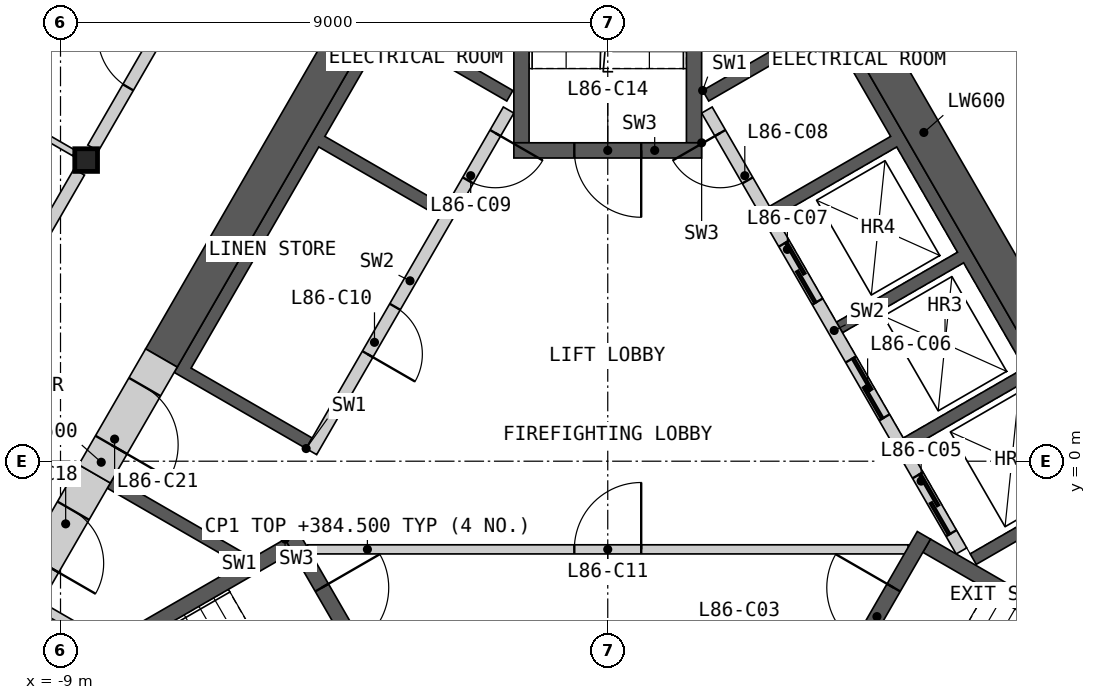
"""IFC4 building model, lengths in metres.
Left out: names, types, materials, properties, quantities, classifications, styles, units other than length and angle.
Written with IfcOpenShell. Run it as: python <this file> out.ifc"""

import sys

from ifc_helpers import new_model, si_unit, direction, frame, frame_2d, origin, origin_2d, place, context, subcontext, project, spatial, polyline, rectangle, i_section, outline, extrude, element, fill, save


model = new_model("IFC4")
c1 = context("Model", 3, precision=1e-05, world=origin(), true_north=direction((0.0, 1.0)))
c2 = subcontext(c1, "Body", "Model", "MODEL_VIEW")
j1 = project(units=[si_unit("LENGTHUNIT", "METRE"), si_unit("PLANEANGLEUNIT", "RADIAN")], contexts=[c1])
p1 = place(None, origin())
s1 = spatial("IfcSite", under=j1, at=p1, CompositionType="ELEMENT")
p2 = place(p1, origin())
s2 = spatial("IfcBuilding", under=s1, at=p2, CompositionType="ELEMENT")
p3 = place(p2, frame((0.0, 0.0, 381.4)))
s3 = spatial("IfcBuildingStorey", under=s2, at=p3, CompositionType="ELEMENT", Elevation=381.4)
p4 = place(p3, frame((-8.578, 4.953, 0.0), z_axis=(0.0, 0.0, 1.0), x_axis=(1.0, 0.0, 0.0)))
e1 = element("IfcColumn", 1, at=p4, inside=s3, PredefinedType="COLUMN", context=c2, shape_type="SweptSolid", body=[
    extrude(i_section(OverallWidth=0.374, OverallDepth=0.372, WebThickness=0.016, FlangeThickness=0.026, at=origin_2d()), origin(), (0.0, 0.0, 1.0), 3.4),
])
p5 = place(p3, origin())
e2 = element("IfcWall", 2, at=p5, inside=s3, PredefinedType="SHEAR", context=c2, shape_type="SweptSolid", body=[
    extrude(outline(polyline([(1.561, 6.097), (3.731, 7.35), (8.231, -0.444), (6.061, -1.697), (5.96, -1.524), (7.952, -0.374), (6.952, 1.358), (4.96, 0.208), (4.861, 0.381), (6.852, 1.531), (5.852, 3.263), (3.861, 2.113), (3.76, 2.287), (5.752, 3.437), (4.752, 5.169), (2.76, 4.019), (2.66, 4.192), (4.652, 5.342), (3.652, 7.074), (1.66, 5.924), (1.561, 6.097)])), origin(), (0.0, 0.0, 1.0), 3.1),
])
p6 = place(p3, frame((5.817, -1.476, 0.0), z_axis=(0.0, 0.0, 1.0), x_axis=(-0.500002616675, 0.866023893041, 0.0)))
e3 = element("IfcWall", 3, at=p6, inside=s3, PredefinedType="SOLIDWALL", context=c2, shape_type="SweptSolid", body=[
    extrude(rectangle(XDim=8.373, YDim=0.2, at=frame_2d((4.187, 0.0))), origin(), (0.0, 0.0, 1.0), 3.1),
])
p7 = place(p6, frame((0.337, 0.0, 0.0)))
e4 = element("IfcOpeningElement", 4, at=p7, cuts=e3, PredefinedType="OPENING", context=c2, shape_type="SweptSolid", body=[
    extrude(rectangle(XDim=1.1, YDim=2.1, at=frame_2d((0.55, 1.05))), frame((0.0, 0.11, 0.0), z_axis=(0.0, -1.0, 0.0), x_axis=(1.0, 0.0, 0.0)), (0.0, 0.0, 1.0), 0.22),
])
p8 = place(p6, frame((2.537, 0.0, 0.0)))
e5 = element("IfcOpeningElement", 5, at=p8, cuts=e3, PredefinedType="OPENING", context=c2, shape_type="SweptSolid", body=[
    extrude(rectangle(XDim=1.1, YDim=2.1, at=frame_2d((0.55, 1.05))), frame((0.0, 0.11, 0.0), z_axis=(0.0, -1.0, 0.0), x_axis=(1.0, 0.0, 0.0)), (0.0, 0.0, 1.0), 0.22),
])
p9 = place(p6, frame((4.737, 0.0, 0.0)))
e6 = element("IfcOpeningElement", 6, at=p9, cuts=e3, PredefinedType="OPENING", context=c2, shape_type="SweptSolid", body=[
    extrude(rectangle(XDim=1.1, YDim=2.1, at=frame_2d((0.55, 1.05))), frame((0.0, 0.11, 0.0), z_axis=(0.0, -1.0, 0.0), x_axis=(1.0, 0.0, 0.0)), (0.0, 0.0, 1.0), 0.22),
])
p10 = place(p6, frame((7.037, 0.0, 0.0)))
e7 = element("IfcOpeningElement", 7, at=p10, cuts=e3, PredefinedType="OPENING", context=c2, shape_type="SweptSolid", body=[
    extrude(rectangle(XDim=0.9, YDim=2.1, at=frame_2d((0.45, 1.05))), frame((0.0, 0.11, 0.0), z_axis=(0.0, -1.0, 0.0), x_axis=(1.0, 0.0, 0.0)), (0.0, 0.0, 1.0), 0.22),
])
p11 = place(p3, origin())
e8 = element("IfcWall", 8, at=p11, inside=s3, PredefinedType="SHEAR", context=c2, shape_type="SweptSolid", body=[
    extrude(outline(polyline([(-6.061, -1.697), (-8.231, -0.444), (-8.131, -0.271), (-5.96, -1.524), (-6.061, -1.697)])), origin(), (0.0, 0.0, 1.0), 3.1),
])
p12 = place(p3, origin())
e9 = element("IfcWall", 9, at=p12, inside=s3, PredefinedType="SHEAR", context=c2, shape_type="SweptSolid", body=[
    extrude(outline(polyline([(-4.96, 0.208), (-7.131, 1.461), (-3.731, 7.35), (-1.561, 6.097), (-1.66, 5.924), (-3.652, 7.074), (-4.652, 5.342), (-2.66, 4.192), (-2.76, 4.019), (-4.752, 5.169), (-6.852, 1.531), (-4.861, 0.381), (-4.96, 0.208)])), origin(), (0.0, 0.0, 1.0), 3.1),
])
p13 = place(p3, frame((-1.631, 5.776, 0.0), z_axis=(0.0, 0.0, 1.0), x_axis=(-0.499992876559, -0.866029516466, 0.0)))
e10 = element("IfcWall", 10, at=p13, inside=s3, PredefinedType="SOLIDWALL", context=c2, shape_type="SweptSolid", body=[
    extrude(rectangle(XDim=6.486, YDim=0.2, at=frame_2d((3.243, 0.0))), origin(), (0.0, 0.0, 1.0), 3.1),
])
p14 = place(p13, frame((0.437, 0.0, 0.0)))
e11 = element("IfcOpeningElement", 11, at=p14, cuts=e10, PredefinedType="OPENING", context=c2, shape_type="SweptSolid", body=[
    extrude(rectangle(XDim=0.9, YDim=2.1, at=frame_2d((0.45, 1.05))), frame((0.0, 0.11, 0.0), z_axis=(0.0, -1.0, 0.0), x_axis=(1.0, 0.0, 0.0)), (0.0, 0.0, 1.0), 0.22),
])
p15 = place(p13, frame((3.737, 0.0, 0.0)))
e12 = element("IfcOpeningElement", 12, at=p15, cuts=e10, PredefinedType="OPENING", context=c2, shape_type="SweptSolid", body=[
    extrude(rectangle(XDim=0.9, YDim=2.1, at=frame_2d((0.45, 1.05))), frame((0.0, 0.11, 0.0), z_axis=(0.0, -1.0, 0.0), x_axis=(1.0, 0.0, 0.0)), (0.0, 0.0, 1.0), 0.22),
])
p16 = place(p3, frame((-4.941, -1.45, 0.0), z_axis=(0.0, 0.0, 1.0), x_axis=(1.0, 0.0, 0.0)))
e13 = element("IfcWall", 13, at=p16, inside=s3, PredefinedType="PARTITIONING", context=c2, shape_type="SweptSolid", body=[
    extrude(rectangle(XDim=9.882, YDim=0.15, at=frame_2d((4.941, 0.0))), origin(), (0.0, 0.0, 1.0), 3.1),
])
p17 = place(p16, frame((4.391, 0.0, 0.0)))
e14 = element("IfcOpeningElement", 14, at=p17, cuts=e13, PredefinedType="OPENING", context=c2, shape_type="SweptSolid", body=[
    extrude(rectangle(XDim=1.1, YDim=2.1, at=frame_2d((0.55, 1.05))), frame((0.0, 0.085, 0.0), z_axis=(0.0, -1.0, 0.0), x_axis=(1.0, 0.0, 0.0)), (0.0, 0.0, 1.0), 0.17),
])
p18 = place(p3, origin())
e15 = element("IfcWall", 15, at=p18, inside=s3, PredefinedType="SHEAR", context=c2, shape_type="SweptSolid", body=[
    extrude(outline(polyline([(-5.307, -1.281), (-10.374, -4.206), (-10.032, -4.298), (-5.182, -1.498), (-5.307, -1.281)])), origin(), (0.0, 0.0, 1.0), 3.1),
])
p19 = place(p3, frame((-5.199, -1.219, 0.0), z_axis=(0.0, 0.0, 1.0), x_axis=(0.499982516597, -0.866035497597, 0.0)))
e16 = element("IfcWall", 16, at=p19, inside=s3, PredefinedType="SHEAR", context=c2, shape_type="SweptSolid", body=[
    extrude(rectangle(XDim=3.088, YDim=0.25, at=frame_2d((1.544, 0.0))), origin(), (0.0, 0.0, 1.0), 3.1),
])
p20 = place(p19, frame((0.994, 0.0, 0.0)))
e17 = element("IfcOpeningElement", 17, at=p20, cuts=e16, PredefinedType="OPENING", context=c2, shape_type="SweptSolid", body=[
    extrude(rectangle(XDim=1.1, YDim=2.1, at=frame_2d((0.55, 1.05))), frame((0.0, 0.135, 0.0), z_axis=(0.0, -1.0, 0.0), x_axis=(1.0, 0.0, 0.0)), (0.0, 0.0, 1.0), 0.27),
])
p21 = place(p3, origin())
e18 = element("IfcWall", 18, at=p21, inside=s3, PredefinedType="SHEAR", context=c2, shape_type="SweptSolid", body=[
    extrude(outline(polyline([(10.032, -4.298), (10.374, -4.206), (5.307, -1.281), (5.182, -1.498), (10.032, -4.298)])), origin(), (0.0, 0.0, 1.0), 3.1),
])
p22 = place(p3, frame((3.655, -3.893, 0.0), z_axis=(0.0, 0.0, 1.0), x_axis=(0.499982516597, 0.866035497597, 0.0)))
e19 = element("IfcWall", 19, at=p22, inside=s3, PredefinedType="SHEAR", context=c2, shape_type="SweptSolid", body=[
    extrude(rectangle(XDim=3.088, YDim=0.25, at=frame_2d((1.544, 0.0))), origin(), (0.0, 0.0, 1.0), 3.1),
])
p23 = place(p22, frame((0.994, 0.0, 0.0)))
e20 = element("IfcOpeningElement", 20, at=p23, cuts=e19, PredefinedType="OPENING", context=c2, shape_type="SweptSolid", body=[
    extrude(rectangle(XDim=1.1, YDim=2.1, at=frame_2d((0.55, 1.05))), frame((0.0, 0.135, 0.0), z_axis=(0.0, -1.0, 0.0), x_axis=(1.0, 0.0, 0.0)), (0.0, 0.0, 1.0), 0.27),
])
p24 = place(p3, origin())
e21 = element("IfcWall", 21, at=p24, inside=s3, PredefinedType="SHEAR", context=c2, shape_type="SweptSolid", body=[
    extrude(outline(polyline([(1.544, 5.237), (1.544, 11.087), (1.294, 10.837), (1.294, 5.237), (1.544, 5.237)])), origin(), (0.0, 0.0, 1.0), 3.1),
])
p25 = place(p3, origin())
e22 = element("IfcWall", 22, at=p25, inside=s3, PredefinedType="SHEAR", context=c2, shape_type="SweptSolid", body=[
    extrude(outline(polyline([(-1.294, 10.837), (-1.544, 11.087), (-1.544, 5.237), (-1.294, 5.237), (-1.294, 10.837)])), origin(), (0.0, 0.0, 1.0), 3.1),
])
p26 = place(p3, frame((1.544, 5.112, 0.0), z_axis=(0.0, 0.0, 1.0), x_axis=(-1.0, 0.0, 0.0)))
e23 = element("IfcWall", 23, at=p26, inside=s3, PredefinedType="SHEAR", context=c2, shape_type="SweptSolid", body=[
    extrude(rectangle(XDim=3.088, YDim=0.25, at=frame_2d((1.544, 0.0))), origin(), (0.0, 0.0, 1.0), 3.1),
])
p27 = place(p26, frame((0.994, 0.0, 0.0)))
e24 = element("IfcOpeningElement", 24, at=p27, cuts=e23, PredefinedType="OPENING", context=c2, shape_type="SweptSolid", body=[
    extrude(rectangle(XDim=1.1, YDim=2.1, at=frame_2d((0.55, 1.05))), frame((0.0, 0.135, 0.0), z_axis=(0.0, -1.0, 0.0), x_axis=(1.0, 0.0, 0.0)), (0.0, 0.0, 1.0), 0.27),
])
p28 = place(p3, frame((-9.35, -2.383, 0.0), z_axis=(0.0, 0.0, 1.0), x_axis=(0.866057962423, -0.499943602543, 0.0)))
e25 = element("IfcWall", 25, at=p28, inside=s3, PredefinedType="PARTITIONING", context=c2, shape_type="SweptSolid", body=[
    extrude(rectangle(XDim=1.242, YDim=0.15, at=frame_2d((0.621, 0.0))), origin(), (0.0, 0.0, 1.0), 3.1),
])
p29 = place(p3, frame((8.841, -0.902, 0.0), z_axis=(0.0, 0.0, 1.0), x_axis=(-0.499995618375, 0.866027933502, 0.0)))
e26 = element("IfcWall", 26, at=p29, inside=s3, PredefinedType="SHEAR", context=c2, shape_type="SweptSolid", body=[
    extrude(rectangle(XDim=14.571, YDim=0.6, at=frame_2d((7.285, 0.0))), origin(), (0.0, 0.0, 1.0), 3.1),
])
p30 = place(p3, frame((-3.639, 8.107, 0.0), z_axis=(0.0, 0.0, 1.0), x_axis=(-0.49999180351, -0.866030135978, 0.0)))
e27 = element("IfcWall", 27, at=p30, inside=s3, PredefinedType="SHEAR", context=c2, shape_type="SweptSolid", body=[
    extrude(rectangle(XDim=7.401, YDim=0.6, at=frame_2d((3.701, 0.0))), origin(), (0.0, 0.0, 1.0), 3.1),
])
p31 = place(p3, frame((-8.44, -0.208, 0.0), z_axis=(0.0, 0.0, 1.0), x_axis=(-0.500001951578, -0.866024277037, 0.0)))
e28 = element("IfcWall", 28, at=p31, inside=s3, PredefinedType="SHEAR", context=c2, shape_type="SweptSolid", body=[
    extrude(rectangle(XDim=2.243, YDim=0.6, at=frame_2d((1.122, 0.0))), origin(), (0.0, 0.0, 1.0), 3.1),
])
p32 = place(p31, frame((0.7, 0.0, 0.0)))
e29 = element("IfcOpeningElement", 29, at=p32, cuts=e28, PredefinedType="OPENING", context=c2, shape_type="SweptSolid", body=[
    extrude(rectangle(XDim=1.0, YDim=2.1, at=frame_2d((0.5, 1.05))), frame((0.0, 0.31, 0.0), z_axis=(0.0, -1.0, 0.0), x_axis=(1.0, 0.0, 0.0)), (0.0, 0.0, 1.0), 0.62),
])
p33 = place(p3, frame((-7.34, 1.698, 0.0), z_axis=(0.0, 0.0, 1.0), x_axis=(-0.50002983664, -0.866008176907, 0.0)))
e30 = element("IfcWall", 30, at=p33, inside=s3, PredefinedType="SHEAR", context=c2, shape_type="SweptSolid", body=[
    extrude(rectangle(XDim=2.2, YDim=0.6, at=frame_2d((1.1, 0.0))), origin(), (0.0, 0.0, 1.0), 3.1),
])
p34 = place(p33, frame((0.55, 0.0, 0.0)))
e31 = element("IfcOpeningElement", 31, at=p34, cuts=e30, PredefinedType="OPENING", context=c2, shape_type="SweptSolid", body=[
    extrude(rectangle(XDim=1.1, YDim=2.1, at=frame_2d((0.55, 1.05))), frame((0.0, 0.31, 0.0), z_axis=(0.0, -1.0, 0.0), x_axis=(1.0, 0.0, 0.0)), (0.0, 0.0, 1.0), 0.62),
])
p35 = place(p3, frame((4.403, 12.185, 0.0), z_axis=(0.0, 0.0, 1.0), x_axis=(0.499992155518, -0.866029932751, 0.0)))
e32 = element("IfcWall", 32, at=p35, inside=s3, PredefinedType="PARTITIONING", context=c2, shape_type="SweptSolid", body=[
    extrude(rectangle(XDim=8.123, YDim=0.2, at=frame_2d((4.062, 0.0))), origin(), (0.0, 0.0, 1.0), 3.1),
])
p36 = place(p35, frame((3.587, 0.0, 0.0)))
e33 = element("IfcOpeningElement", 33, at=p36, cuts=e32, PredefinedType="OPENING", context=c2, shape_type="SweptSolid", body=[
    extrude(rectangle(XDim=0.95, YDim=2.1, at=frame_2d((0.475, 1.05))), frame((0.0, 0.11, 0.0), z_axis=(0.0, -1.0, 0.0), x_axis=(1.0, 0.0, 0.0)), (0.0, 0.0, 1.0), 0.22),
])
p37 = place(p3, frame((-8.465, 5.15, 0.0), z_axis=(0.0, 0.0, 1.0), x_axis=(0.499992155518, 0.866029932751, 0.0)))
e34 = element("IfcWall", 34, at=p37, inside=s3, PredefinedType="PARTITIONING", context=c2, shape_type="SweptSolid", body=[
    extrude(rectangle(XDim=8.123, YDim=0.2, at=frame_2d((4.062, 0.0))), origin(), (0.0, 0.0, 1.0), 3.1),
])
p38 = place(p37, frame((1.153, 0.0, 0.0)))
e35 = element("IfcOpeningElement", 35, at=p38, cuts=e34, PredefinedType="OPENING", context=c2, shape_type="SweptSolid", body=[
    extrude(rectangle(XDim=1.0, YDim=2.1, at=frame_2d((0.5, 1.05))), frame((0.0, 0.11, 0.0), z_axis=(0.0, -1.0, 0.0), x_axis=(1.0, 0.0, 0.0)), (0.0, 0.0, 1.0), 0.22),
])
p39 = place(p3, frame((-12.754, -2.279, 0.0), z_axis=(0.0, 0.0, 1.0), x_axis=(0.500001682468, 0.866024432409, 0.0)))
e36 = element("IfcWall", 36, at=p39, inside=s3, PredefinedType="PARTITIONING", context=c2, shape_type="SweptSolid", body=[
    extrude(rectangle(XDim=8.124, YDim=0.2, at=frame_2d((4.062, 0.0))), origin(), (0.0, 0.0, 1.0), 3.1),
])
p40 = place(p39, frame((1.153, 0.0, 0.0)))
e37 = element("IfcOpeningElement", 37, at=p40, cuts=e36, PredefinedType="OPENING", context=c2, shape_type="SweptSolid", body=[
    extrude(rectangle(XDim=1.0, YDim=2.1, at=frame_2d((0.5, 1.05))), frame((0.0, 0.11, 0.0), z_axis=(0.0, -1.0, 0.0), x_axis=(1.0, 0.0, 0.0)), (0.0, 0.0, 1.0), 0.22),
])
p41 = place(p3, frame((3.926, 19.811, 0.0), z_axis=(0.0, 0.0, 1.0), x_axis=(0.500001082559, -0.866024778768, 0.0)))
e38 = element("IfcWall", 38, at=p41, inside=s3, PredefinedType="PARTITIONING", context=c2, shape_type="SweptSolid", body=[
    extrude(rectangle(XDim=15.094, YDim=0.2, at=frame_2d((7.547, 0.0))), origin(), (0.0, 0.0, 1.0), 2.33),
])
p42 = place(p41, frame((3.761, 0.0, 0.0)))
e39 = element("IfcOpeningElement", 39, at=p42, cuts=e38, PredefinedType="OPENING", context=c2, shape_type="SweptSolid", body=[
    extrude(rectangle(XDim=0.95, YDim=2.1, at=frame_2d((0.475, 1.05))), frame((0.0, 0.11, 0.0), z_axis=(0.0, -1.0, 0.0), x_axis=(1.0, 0.0, 0.0)), (0.0, 0.0, 1.0), 0.22),
])
p43 = place(p3, frame((-18.869, 10.894, 0.0), z_axis=(0.0, 0.0, 1.0), x_axis=(0.866023724155, -0.500002909193, 0.0)))
e40 = element("IfcWall", 40, at=p43, inside=s3, PredefinedType="PARTITIONING", context=c2, shape_type="SweptSolid", body=[
    extrude(rectangle(XDim=11.655, YDim=0.1, at=frame_2d((5.827, 0.0))), origin(), (0.0, 0.0, 1.0), 2.33),
])
p44 = place(p43, frame((6.253, 0.0, 0.0)))
e41 = element("IfcOpeningElement", 41, at=p44, cuts=e40, PredefinedType="OPENING", context=c2, shape_type="SweptSolid", body=[
    extrude(rectangle(XDim=0.95, YDim=2.1, at=frame_2d((0.475, 1.05))), frame((0.0, 0.06, 0.0), z_axis=(0.0, -1.0, 0.0), x_axis=(1.0, 0.0, 0.0)), (0.0, 0.0, 1.0), 0.12),
])
p45 = place(p7, origin())
e42 = element("IfcDoor", 42, at=p45, inside=s3, OperationType="SLIDING_TO_LEFT", PredefinedType="DOOR", context=c2, shape_type="SweptSolid", body=[
    extrude(rectangle(XDim=1.1, YDim=2.1, at=frame_2d((0.55, 1.05))), frame((0.0, 0.025, 0.0), z_axis=(0.0, -1.0, 0.0), x_axis=(1.0, 0.0, 0.0)), (0.0, 0.0, 1.0), 0.05),
])
fill(e4, e42)
p46 = place(p8, origin())
e43 = element("IfcDoor", 43, at=p46, inside=s3, OperationType="SLIDING_TO_LEFT", PredefinedType="DOOR", context=c2, shape_type="SweptSolid", body=[
    extrude(rectangle(XDim=1.1, YDim=2.1, at=frame_2d((0.55, 1.05))), frame((0.0, 0.025, 0.0), z_axis=(0.0, -1.0, 0.0), x_axis=(1.0, 0.0, 0.0)), (0.0, 0.0, 1.0), 0.05),
])
fill(e5, e43)
p47 = place(p9, origin())
e44 = element("IfcDoor", 44, at=p47, inside=s3, OperationType="SLIDING_TO_LEFT", PredefinedType="DOOR", context=c2, shape_type="SweptSolid", body=[
    extrude(rectangle(XDim=1.1, YDim=2.1, at=frame_2d((0.55, 1.05))), frame((0.0, 0.025, 0.0), z_axis=(0.0, -1.0, 0.0), x_axis=(1.0, 0.0, 0.0)), (0.0, 0.0, 1.0), 0.05),
])
fill(e6, e44)
p48 = place(p10, origin())
e45 = element("IfcDoor", 45, at=p48, inside=s3, OperationType="SINGLE_SWING_RIGHT", PredefinedType="DOOR", context=c2, shape_type="SweptSolid", body=[
    extrude(rectangle(XDim=0.9, YDim=2.1, at=frame_2d((0.45, 1.05))), frame((0.0, 0.025, 0.0), z_axis=(0.0, -1.0, 0.0), x_axis=(1.0, 0.0, 0.0)), (0.0, 0.0, 1.0), 0.05),
])
fill(e7, e45)
p49 = place(p14, origin())
e46 = element("IfcDoor", 46, at=p49, inside=s3, OperationType="SINGLE_SWING_LEFT", PredefinedType="DOOR", context=c2, shape_type="SweptSolid", body=[
    extrude(rectangle(XDim=0.9, YDim=2.1, at=frame_2d((0.45, 1.05))), frame((0.0, 0.025, 0.0), z_axis=(0.0, -1.0, 0.0), x_axis=(1.0, 0.0, 0.0)), (0.0, 0.0, 1.0), 0.05),
])
fill(e11, e46)
p50 = place(p15, origin())
e47 = element("IfcDoor", 47, at=p50, inside=s3, OperationType="SINGLE_SWING_RIGHT", PredefinedType="DOOR", context=c2, shape_type="SweptSolid", body=[
    extrude(rectangle(XDim=0.9, YDim=2.1, at=frame_2d((0.45, 1.05))), frame((0.0, 0.025, 0.0), z_axis=(0.0, -1.0, 0.0), x_axis=(1.0, 0.0, 0.0)), (0.0, 0.0, 1.0), 0.05),
])
fill(e12, e47)
p51 = place(p17, origin())
e48 = element("IfcDoor", 48, at=p51, inside=s3, OperationType="SINGLE_SWING_RIGHT", PredefinedType="DOOR", context=c2, shape_type="SweptSolid", body=[
    extrude(rectangle(XDim=1.1, YDim=2.1, at=frame_2d((0.55, 1.05))), frame((0.0, 0.025, 0.0), z_axis=(0.0, -1.0, 0.0), x_axis=(1.0, 0.0, 0.0)), (0.0, 0.0, 1.0), 0.05),
])
fill(e14, e48)
p52 = place(p20, origin())
e49 = element("IfcDoor", 49, at=p52, inside=s3, OperationType="SINGLE_SWING_LEFT", PredefinedType="DOOR", context=c2, shape_type="SweptSolid", body=[
    extrude(rectangle(XDim=1.1, YDim=2.1, at=frame_2d((0.55, 1.05))), frame((0.0, 0.025, 0.0), z_axis=(0.0, -1.0, 0.0), x_axis=(1.0, 0.0, 0.0)), (0.0, 0.0, 1.0), 0.05),
])
fill(e17, e49)
p53 = place(p23, origin())
e50 = element("IfcDoor", 50, at=p53, inside=s3, OperationType="SINGLE_SWING_RIGHT", PredefinedType="DOOR", context=c2, shape_type="SweptSolid", body=[
    extrude(rectangle(XDim=1.1, YDim=2.1, at=frame_2d((0.55, 1.05))), frame((0.0, 0.025, 0.0), z_axis=(0.0, -1.0, 0.0), x_axis=(1.0, 0.0, 0.0)), (0.0, 0.0, 1.0), 0.05),
])
fill(e20, e50)
p54 = place(p27, origin())
e51 = element("IfcDoor", 51, at=p54, inside=s3, OperationType="SINGLE_SWING_LEFT", PredefinedType="DOOR", context=c2, shape_type="SweptSolid", body=[
    extrude(rectangle(XDim=1.1, YDim=2.1, at=frame_2d((0.55, 1.05))), frame((0.0, 0.025, 0.0), z_axis=(0.0, -1.0, 0.0), x_axis=(1.0, 0.0, 0.0)), (0.0, 0.0, 1.0), 0.05),
])
fill(e24, e51)
p55 = place(p32, origin())
e52 = element("IfcDoor", 52, at=p55, inside=s3, OperationType="SINGLE_SWING_RIGHT", PredefinedType="DOOR", context=c2, shape_type="SweptSolid", body=[
    extrude(rectangle(XDim=1.0, YDim=2.1, at=frame_2d((0.5, 1.05))), frame((0.0, 0.055, 0.0), z_axis=(0.0, -1.0, 0.0), x_axis=(1.0, 0.0, 0.0)), (0.0, 0.0, 1.0), 0.05),
])
fill(e29, e52)
p56 = place(p34, origin())
e53 = element("IfcDoor", 53, at=p56, inside=s3, OperationType="SINGLE_SWING_RIGHT", PredefinedType="DOOR", context=c2, shape_type="SweptSolid", body=[
    extrude(rectangle(XDim=1.1, YDim=2.1, at=frame_2d((0.55, 1.05))), frame((0.0, 0.055, 0.0), z_axis=(0.0, -1.0, 0.0), x_axis=(1.0, 0.0, 0.0)), (0.0, 0.0, 1.0), 0.05),
])
fill(e31, e53)
p57 = place(p38, origin())
e54 = element("IfcDoor", 54, at=p57, inside=s3, OperationType="SINGLE_SWING_RIGHT", PredefinedType="DOOR", context=c2, shape_type="SweptSolid", body=[
    extrude(rectangle(XDim=1.0, YDim=2.1, at=frame_2d((0.5, 1.05))), frame((0.0, 0.025, 0.0), z_axis=(0.0, -1.0, 0.0), x_axis=(1.0, 0.0, 0.0)), (0.0, 0.0, 1.0), 0.05),
])
fill(e35, e54)
save(model, sys.argv[1])
